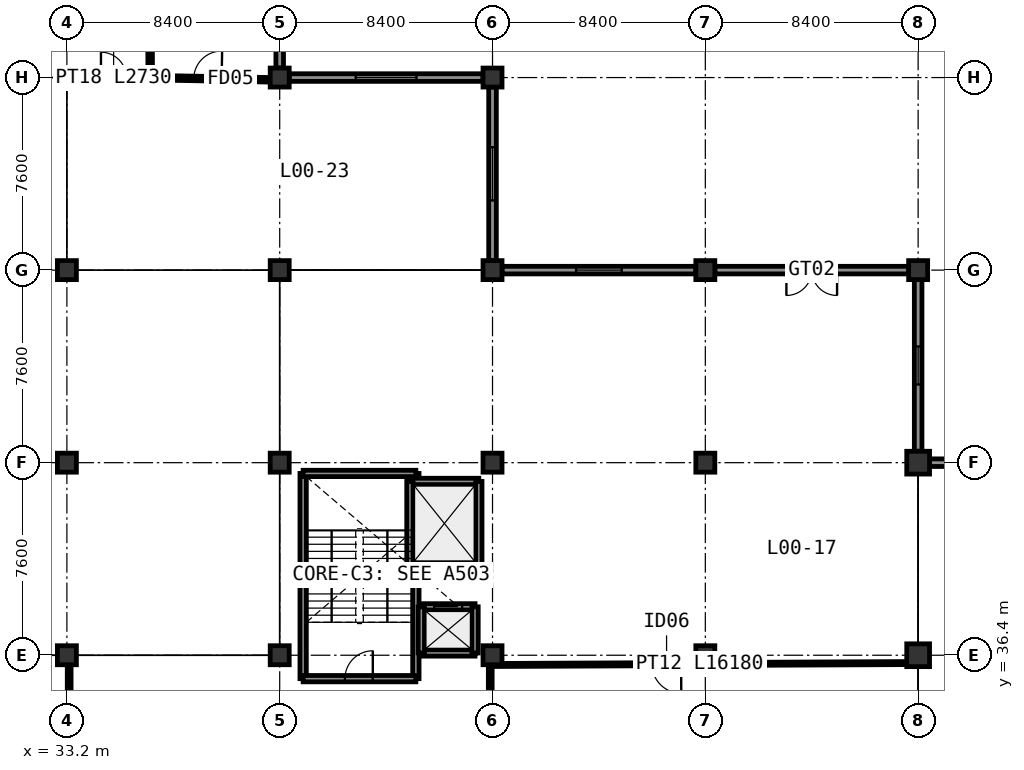
"""IFC4 building model, lengths in metres.
Left out: names, types, materials, properties, quantities, classifications, styles, units other than length and angle.
Written with IfcOpenShell. Run it as: python <this file> out.ifc"""

import sys

from ifc_helpers import new_model, si_unit, direction, frame, frame_2d, origin, origin_2d, place, context, subcontext, project, spatial, rectangle, extrude, element, fill, save


model = new_model("IFC4")
c1 = context("Model", 3, precision=1e-05, world=origin(), true_north=direction((0.0, 1.0)))
c2 = subcontext(c1, "Body", "Model", "MODEL_VIEW")
j1 = project(units=[si_unit("LENGTHUNIT", "METRE"), si_unit("PLANEANGLEUNIT", "RADIAN")], contexts=[c1])
p1 = place(None, origin())
s1 = spatial("IfcSite", under=j1, at=p1, CompositionType="ELEMENT")
p2 = place(p1, origin())
s2 = spatial("IfcBuilding", under=s1, at=p2, CompositionType="ELEMENT")
p3 = place(p2, origin())
s3 = spatial("IfcBuildingStorey", under=s2, at=p3, CompositionType="ELEMENT", Elevation=0.0)
for number, where, z_axis, x_axis in (
    (1, (33.2, 36.4, 0.0), (0.0, 0.0, 1.0), (1.0, 0.0, 0.0)),
    (2, (41.6, 36.4, 0.0), (0.0, 0.0, 1.0), (1.0, 0.0, 0.0)),
    (3, (50.0, 36.4, 0.0), (0.0, 0.0, 1.0), (1.0, 0.0, 0.0)),
    (4, (58.4, 36.4, 0.0), (0.0, 0.0, 1.0), (1.0, 0.0, 0.0)),
):
    element("IfcColumn", number, at=place(p3, frame(where, z_axis=z_axis, x_axis=x_axis)), inside=s3, PredefinedType="COLUMN", context=c2, shape_type="SweptSolid", body=[
        extrude(rectangle(XDim=0.75, YDim=0.75, at=origin_2d()), origin(), (0.0, 0.0, 1.0), 4.8),
    ])
p4 = place(p3, frame((66.8, 36.4, 0.0), z_axis=(0.0, 0.0, 1.0), x_axis=(1.0, 0.0, 0.0)))
e5 = element("IfcColumn", 5, at=p4, inside=s3, PredefinedType="COLUMN", context=c2, shape_type="SweptSolid", body=[
    extrude(rectangle(XDim=0.9, YDim=0.9, at=origin_2d()), origin(), (0.0, 0.0, 1.0), 4.8),
])
for number, where, z_axis, x_axis in (
    (6, (33.2, 44.0, 0.0), (0.0, 0.0, 1.0), (1.0, 0.0, 0.0)),
    (7, (41.6, 44.0, 0.0), (0.0, 0.0, 1.0), (1.0, 0.0, 0.0)),
    (8, (50.0, 44.0, 0.0), (0.0, 0.0, 1.0), (1.0, 0.0, 0.0)),
    (9, (58.4, 44.0, 0.0), (0.0, 0.0, 1.0), (1.0, 0.0, 0.0)),
):
    element("IfcColumn", number, at=place(p3, frame(where, z_axis=z_axis, x_axis=x_axis)), inside=s3, PredefinedType="COLUMN", context=c2, shape_type="SweptSolid", body=[
        extrude(rectangle(XDim=0.75, YDim=0.75, at=origin_2d()), origin(), (0.0, 0.0, 1.0), 4.8),
    ])
p5 = place(p3, frame((66.8, 44.0, 0.0), z_axis=(0.0, 0.0, 1.0), x_axis=(1.0, 0.0, 0.0)))
e10 = element("IfcColumn", 10, at=p5, inside=s3, PredefinedType="COLUMN", context=c2, shape_type="SweptSolid", body=[
    extrude(rectangle(XDim=0.9, YDim=0.9, at=origin_2d()), origin(), (0.0, 0.0, 1.0), 4.8),
])
for number, where, z_axis, x_axis in (
    (11, (33.2, 51.6, 0.0), (0.0, 0.0, 1.0), (1.0, 0.0, 0.0)),
    (12, (41.6, 51.6, 0.0), (0.0, 0.0, 1.0), (1.0, 0.0, 0.0)),
    (13, (50.0, 51.6, 0.0), (0.0, 0.0, 1.0), (1.0, 0.0, 0.0)),
    (14, (58.4, 51.6, 0.0), (0.0, 0.0, 1.0), (1.0, 0.0, 0.0)),
    (15, (66.8, 51.6, 0.0), (0.0, 0.0, 1.0), (1.0, 0.0, 0.0)),
    (16, (33.2, 59.2, 0.0), (0.0, 0.0, 1.0), (1.0, 0.0, 0.0)),
    (17, (41.6, 59.2, 0.0), (0.0, 0.0, 1.0), (1.0, 0.0, 0.0)),
    (18, (50.0, 59.2, 0.0), (0.0, 0.0, 1.0), (1.0, 0.0, 0.0)),
):
    element("IfcColumn", number, at=place(p3, frame(where, z_axis=z_axis, x_axis=x_axis)), inside=s3, PredefinedType="COLUMN", context=c2, shape_type="SweptSolid", body=[
        extrude(rectangle(XDim=0.75, YDim=0.75, at=origin_2d()), origin(), (0.0, 0.0, 1.0), 4.8),
    ])
p6 = place(p3, frame((74.75, 44.0, 0.0), z_axis=(0.0, 0.0, 1.0), x_axis=(-1.0, 0.0, 0.0)))
e19 = element("IfcWall", 19, at=p6, inside=s3, PredefinedType="SOLIDWALL", context=c2, shape_type="SweptSolid", body=[
    extrude(rectangle(XDim=7.5, YDim=0.3, at=frame_2d((3.75, 0.0))), origin(), (0.0, 0.0, 1.0), 4.047),
])
p7 = place(p6, frame((3.15, 0.0, 0.95)))
e20 = element("IfcOpeningElement", 20, at=p7, cuts=e19, PredefinedType="OPENING", context=c2, shape_type="SweptSolid", body=[
    extrude(rectangle(XDim=1.2, YDim=2.1, at=frame_2d((0.6, 1.05))), frame((0.0, 0.16, 0.0), z_axis=(0.0, -1.0, 0.0), x_axis=(1.0, 0.0, 0.0)), (0.0, 0.0, 1.0), 0.32),
])
p8 = place(p3, frame((66.8, 44.45, 0.0), z_axis=(0.0, 0.0, 1.0), x_axis=(0.0, 1.0, 0.0)))
e21 = element("IfcWall", 21, at=p8, inside=s3, PredefinedType="SOLIDWALL", context=c2, shape_type="SweptSolid", body=[
    extrude(rectangle(XDim=6.775, YDim=0.3, at=frame_2d((3.388, 0.0))), origin(), (0.0, 0.0, 1.0), 3.81),
])
p9 = place(p8, frame((2.637, 0.0, 0.95)))
e22 = element("IfcOpeningElement", 22, at=p9, cuts=e21, PredefinedType="OPENING", context=c2, shape_type="SweptSolid", body=[
    extrude(rectangle(XDim=1.5, YDim=2.1, at=frame_2d((0.75, 1.05))), frame((0.0, 0.16, 0.0), z_axis=(0.0, -1.0, 0.0), x_axis=(1.0, 0.0, 0.0)), (0.0, 0.0, 1.0), 0.32),
])
p10 = place(p3, frame((66.425, 51.6, 0.0), z_axis=(0.0, 0.0, 1.0), x_axis=(-1.0, 0.0, 0.0)))
e23 = element("IfcWall", 23, at=p10, inside=s3, PredefinedType="SOLIDWALL", context=c2, shape_type="SweptSolid", body=[
    extrude(rectangle(XDim=7.65, YDim=0.3, at=frame_2d((3.825, 0.0))), origin(), (0.0, 0.0, 1.0), 4.047),
])
p11 = place(p10, frame((2.825, 0.0, 0.0)))
e24 = element("IfcOpeningElement", 24, at=p11, cuts=e23, PredefinedType="OPENING", context=c2, shape_type="SweptSolid", body=[
    extrude(rectangle(XDim=2.0, YDim=2.1, at=frame_2d((1.0, 1.05))), frame((0.0, 0.16, 0.0), z_axis=(0.0, -1.0, 0.0), x_axis=(1.0, 0.0, 0.0)), (0.0, 0.0, 1.0), 0.32),
])
p12 = place(p3, frame((58.025, 51.6, 0.0), z_axis=(0.0, 0.0, 1.0), x_axis=(-1.0, 0.0, 0.0)))
e25 = element("IfcWall", 25, at=p12, inside=s3, PredefinedType="SOLIDWALL", context=c2, shape_type="SweptSolid", body=[
    extrude(rectangle(XDim=7.65, YDim=0.3, at=frame_2d((3.825, 0.0))), origin(), (0.0, 0.0, 1.0), 4.047),
])
p13 = place(p12, frame((2.925, 0.0, 0.95)))
e26 = element("IfcOpeningElement", 26, at=p13, cuts=e25, PredefinedType="OPENING", context=c2, shape_type="SweptSolid", body=[
    extrude(rectangle(XDim=1.8, YDim=2.1, at=frame_2d((0.9, 1.05))), frame((0.0, 0.16, 0.0), z_axis=(0.0, -1.0, 0.0), x_axis=(1.0, 0.0, 0.0)), (0.0, 0.0, 1.0), 0.32),
])
p14 = place(p3, frame((50.0, 51.975, 0.0), z_axis=(0.0, 0.0, 1.0), x_axis=(0.0, 1.0, 0.0)))
e27 = element("IfcWall", 27, at=p14, inside=s3, PredefinedType="SOLIDWALL", context=c2, shape_type="SweptSolid", body=[
    extrude(rectangle(XDim=6.85, YDim=0.3, at=frame_2d((3.425, 0.0))), origin(), (0.0, 0.0, 1.0), 4.5),
])
p15 = place(p14, frame((2.375, 0.0, 0.95)))
e28 = element("IfcOpeningElement", 28, at=p15, cuts=e27, PredefinedType="OPENING", context=c2, shape_type="SweptSolid", body=[
    extrude(rectangle(XDim=2.1, YDim=2.1, at=frame_2d((1.05, 1.05))), frame((0.0, 0.16, 0.0), z_axis=(0.0, -1.0, 0.0), x_axis=(1.0, 0.0, 0.0)), (0.0, 0.0, 1.0), 0.32),
])
p16 = place(p3, frame((49.625, 59.2, 0.0), z_axis=(0.0, 0.0, 1.0), x_axis=(-1.0, 0.0, 0.0)))
e29 = element("IfcWall", 29, at=p16, inside=s3, PredefinedType="SOLIDWALL", context=c2, shape_type="SweptSolid", body=[
    extrude(rectangle(XDim=7.65, YDim=0.3, at=frame_2d((3.825, 0.0))), origin(), (0.0, 0.0, 1.0), 4.5),
])
p17 = place(p16, frame((2.625, 0.0, 0.95)))
e30 = element("IfcOpeningElement", 30, at=p17, cuts=e29, PredefinedType="OPENING", context=c2, shape_type="SweptSolid", body=[
    extrude(rectangle(XDim=2.4, YDim=2.1, at=frame_2d((1.2, 1.05))), frame((0.0, 0.16, 0.0), z_axis=(0.0, -1.0, 0.0), x_axis=(1.0, 0.0, 0.0)), (0.0, 0.0, 1.0), 0.32),
])
p18 = place(p3, frame((41.6, 59.575, 0.0), z_axis=(0.0, 0.0, 1.0), x_axis=(0.0, 1.0, 0.0)))
e31 = element("IfcWall", 31, at=p18, inside=s3, PredefinedType="SOLIDWALL", context=c2, shape_type="SweptSolid", body=[
    extrude(rectangle(XDim=6.85, YDim=0.3, at=frame_2d((3.425, 0.0))), origin(), (0.0, 0.0, 1.0), 4.5),
])
p19 = place(p18, frame((2.075, 0.0, 0.95)))
e32 = element("IfcOpeningElement", 32, at=p19, cuts=e31, PredefinedType="OPENING", context=c2, shape_type="SweptSolid", body=[
    extrude(rectangle(XDim=2.7, YDim=2.1, at=frame_2d((1.35, 1.05))), frame((0.0, 0.16, 0.0), z_axis=(0.0, -1.0, 0.0), x_axis=(1.0, 0.0, 0.0)), (0.0, 0.0, 1.0), 0.32),
])
for number, where, z_axis, x_axis in (
    (33, (42.525, 35.475, 0.0), (0.0, 0.0, 1.0), (0.0, 1.0, 0.0)),
    (34, (46.975, 35.475, 0.0), (0.0, 0.0, 1.0), (0.0, 1.0, 0.0)),
):
    element("IfcWall", number, at=place(p3, frame(where, z_axis=z_axis, x_axis=x_axis)), inside=s3, PredefinedType="SHEAR", context=c2, shape_type="SweptSolid", body=[
        extrude(rectangle(XDim=8.1, YDim=0.25, at=frame_2d((4.05, 0.0))), origin(), (0.0, 0.0, 1.0), 4.52),
    ])
p20 = place(p3, frame((42.525, 43.575, 0.0), z_axis=(0.0, 0.0, 1.0), x_axis=(1.0, 0.0, 0.0)))
e35 = element("IfcWall", 35, at=p20, inside=s3, PredefinedType="SHEAR", context=c2, shape_type="SweptSolid", body=[
    extrude(rectangle(XDim=4.45, YDim=0.25, at=frame_2d((2.225, 0.0))), origin(), (0.0, 0.0, 1.0), 4.52),
])
p21 = place(p3, frame((42.525, 35.475, 0.0), z_axis=(0.0, 0.0, 1.0), x_axis=(1.0, 0.0, 0.0)))
e36 = element("IfcWall", 36, at=p21, inside=s3, PredefinedType="SHEAR", context=c2, shape_type="SweptSolid", body=[
    extrude(rectangle(XDim=4.45, YDim=0.25, at=frame_2d((2.225, 0.0))), origin(), (0.0, 0.0, 1.0), 4.52),
])
p22 = place(p21, frame((1.65, 0.0, 0.0)))
e37 = element("IfcOpeningElement", 37, at=p22, cuts=e36, PredefinedType="OPENING", context=c2, shape_type="SweptSolid", body=[
    extrude(rectangle(XDim=1.1, YDim=2.1, at=frame_2d((0.55, 1.05))), frame((0.0, 0.135, 0.0), z_axis=(0.0, -1.0, 0.0), x_axis=(1.0, 0.0, 0.0)), (0.0, 0.0, 1.0), 0.27),
])
p23 = place(p3, frame((47.19, 36.49, 0.0), z_axis=(0.0, 0.0, 1.0), x_axis=(1.0, 0.0, 0.0)))
e38 = element("IfcWall", 38, at=p23, inside=s3, PredefinedType="SHEAR", context=c2, shape_type="SweptSolid", body=[
    extrude(rectangle(XDim=2.12, YDim=0.25, at=frame_2d((1.06, 0.0))), origin(), (0.0, 0.0, 1.0), 4.52),
])
p24 = place(p3, frame((47.19, 38.31, 0.0), z_axis=(0.0, 0.0, 1.0), x_axis=(1.0, 0.0, 0.0)))
e39 = element("IfcWall", 39, at=p24, inside=s3, PredefinedType="SHEAR", context=c2, shape_type="SweptSolid", body=[
    extrude(rectangle(XDim=2.12, YDim=0.25, at=frame_2d((1.06, 0.0))), origin(), (0.0, 0.0, 1.0), 4.52),
])
p25 = place(p24, frame((0.51, 0.0, 0.0)))
e40 = element("IfcOpeningElement", 40, at=p25, cuts=e39, PredefinedType="OPENING", context=c2, shape_type="SweptSolid", body=[
    extrude(rectangle(XDim=1.1, YDim=2.15, at=frame_2d((0.55, 1.075))), frame((0.0, 0.135, 0.0), z_axis=(0.0, -1.0, 0.0), x_axis=(1.0, 0.0, 0.0)), (0.0, 0.0, 1.0), 0.27),
])
for number, where, z_axis, x_axis in (
    (41, (47.19, 36.49, 0.0), (0.0, 0.0, 1.0), (0.0, 1.0, 0.0)),
    (42, (49.31, 36.49, 0.0), (0.0, 0.0, 1.0), (0.0, 1.0, 0.0)),
):
    element("IfcWall", number, at=place(p3, frame(where, z_axis=z_axis, x_axis=x_axis)), inside=s3, PredefinedType="SHEAR", context=c2, shape_type="SweptSolid", body=[
        extrude(rectangle(XDim=1.82, YDim=0.25, at=frame_2d((0.91, 0.0))), origin(), (0.0, 0.0, 1.0), 4.52),
    ])
p26 = place(p3, frame((46.74, 39.94, 0.0), z_axis=(0.0, 0.0, 1.0), x_axis=(1.0, 0.0, 0.0)))
e43 = element("IfcWall", 43, at=p26, inside=s3, PredefinedType="SHEAR", context=c2, shape_type="SweptSolid", body=[
    extrude(rectangle(XDim=2.72, YDim=0.25, at=frame_2d((1.36, 0.0))), origin(), (0.0, 0.0, 1.0), 4.52),
])
p27 = place(p26, frame((0.61, 0.0, 0.0)))
e44 = element("IfcOpeningElement", 44, at=p27, cuts=e43, PredefinedType="OPENING", context=c2, shape_type="SweptSolid", body=[
    extrude(rectangle(XDim=1.5, YDim=2.3, at=frame_2d((0.75, 1.15))), frame((0.0, 0.135, 0.0), z_axis=(0.0, -1.0, 0.0), x_axis=(1.0, 0.0, 0.0)), (0.0, 0.0, 1.0), 0.27),
])
p28 = place(p3, frame((46.74, 43.26, 0.0), z_axis=(0.0, 0.0, 1.0), x_axis=(1.0, 0.0, 0.0)))
e45 = element("IfcWall", 45, at=p28, inside=s3, PredefinedType="SHEAR", context=c2, shape_type="SweptSolid", body=[
    extrude(rectangle(XDim=2.72, YDim=0.25, at=frame_2d((1.36, 0.0))), origin(), (0.0, 0.0, 1.0), 4.52),
])
for number, where, z_axis, x_axis in (
    (46, (46.74, 39.94, 0.0), (0.0, 0.0, 1.0), (0.0, 1.0, 0.0)),
    (47, (49.46, 39.94, 0.0), (0.0, 0.0, 1.0), (0.0, 1.0, 0.0)),
):
    element("IfcWall", number, at=place(p3, frame(where, z_axis=z_axis, x_axis=x_axis)), inside=s3, PredefinedType="SHEAR", context=c2, shape_type="SweptSolid", body=[
        extrude(rectangle(XDim=3.32, YDim=0.25, at=frame_2d((1.66, 0.0))), origin(), (0.0, 0.0, 1.0), 4.52),
    ])
p29 = place(p3, frame((33.68, 59.2, 0.0), z_axis=(0.0, 0.0, 1.0), x_axis=(1.0, 0.0, 0.0)))
e48 = element("IfcWall", 48, at=p29, inside=s3, PredefinedType="PARTITIONING", context=c2, shape_type="SweptSolid", body=[
    extrude(rectangle(XDim=2.729, YDim=0.18, at=frame_2d((1.365, 0.0))), origin(), (0.0, 0.0, 1.0), 4.5),
])
p30 = place(p29, frame((0.865, 0.0, 0.0)))
e49 = element("IfcOpeningElement", 49, at=p30, cuts=e48, PredefinedType="OPENING", context=c2, shape_type="SweptSolid", body=[
    extrude(rectangle(XDim=1.0, YDim=2.1, at=frame_2d((0.5, 1.05))), frame((0.0, 0.1, 0.0), z_axis=(0.0, -1.0, 0.0), x_axis=(1.0, 0.0, 0.0)), (0.0, 0.0, 1.0), 0.2),
])
p31 = place(p3, frame((66.26, 36.09, 0.0), z_axis=(0.0, 0.0, 1.0), x_axis=(-0.999989479484, -0.004587038489, 0.0)))
e50 = element("IfcWall", 50, at=p31, inside=s3, PredefinedType="PARTITIONING", context=c2, shape_type="SweptSolid", body=[
    extrude(rectangle(XDim=16.18, YDim=0.12, at=frame_2d((8.09, 0.0))), origin(), (0.0, 0.0, 1.0), 4.5),
])
p32 = place(p31, frame((8.815, 0.0, 0.0)))
e51 = element("IfcOpeningElement", 51, at=p32, cuts=e50, PredefinedType="OPENING", context=c2, shape_type="SweptSolid", body=[
    extrude(rectangle(XDim=1.15, YDim=2.12, at=frame_2d((0.575, 1.06))), frame((0.0, 0.07, 0.0), z_axis=(0.0, -1.0, 0.0), x_axis=(1.0, 0.0, 0.0)), (0.0, 0.0, 1.0), 0.14),
])
p33 = place(p3, frame((36.49, 59.29, 0.0), z_axis=(0.0, 0.0, 1.0), x_axis=(-0.004757754169, 0.999988681824, 0.0)))
e52 = element("IfcWall", 52, at=p33, inside=s3, PredefinedType="PARTITIONING", context=c2, shape_type="SweptSolid", body=[
    extrude(rectangle(XDim=18.73, YDim=0.18, at=frame_2d((9.365, 0.0))), origin(), (0.0, 0.0, 1.0), 4.5),
])
p34 = place(p33, frame((8.865, 0.0, 0.0)))
e53 = element("IfcOpeningElement", 53, at=p34, cuts=e52, PredefinedType="OPENING", context=c2, shape_type="SweptSolid", body=[
    extrude(rectangle(XDim=1.0, YDim=2.1, at=frame_2d((0.5, 1.05))), frame((0.0, 0.1, 0.0), z_axis=(0.0, -1.0, 0.0), x_axis=(1.0, 0.0, 0.0)), (0.0, 0.0, 1.0), 0.2),
])
p35 = place(p3, frame((33.29, 29.265, 0.0), z_axis=(0.0, 0.0, 1.0), x_axis=(0.0, 1.0, 0.0)))
e54 = element("IfcWall", 54, at=p35, inside=s3, PredefinedType="PARTITIONING", context=c2, shape_type="SweptSolid", body=[
    extrude(rectangle(XDim=6.655, YDim=0.15, at=frame_2d((3.328, 0.0))), origin(), (0.0, 0.0, 1.0), 4.5),
])
p36 = place(p35, frame((2.603, 0.0, 0.0)))
e55 = element("IfcOpeningElement", 55, at=p36, cuts=e54, PredefinedType="OPENING", context=c2, shape_type="SweptSolid", body=[
    extrude(rectangle(XDim=1.45, YDim=2.18, at=frame_2d((0.725, 1.09))), frame((0.0, 0.085, 0.0), z_axis=(0.0, -1.0, 0.0), x_axis=(1.0, 0.0, 0.0)), (0.0, 0.0, 1.0), 0.17),
])
p37 = place(p3, frame((49.91, 35.92, 0.0), z_axis=(0.0, 0.0, 1.0), x_axis=(-7.3370263e-05, -0.999999997308, 0.0)))
e56 = element("IfcWall", 56, at=p37, inside=s3, PredefinedType="PARTITIONING", context=c2, shape_type="SweptSolid", body=[
    extrude(rectangle(XDim=6.655, YDim=0.15, at=frame_2d((3.328, 0.0))), origin(), (0.0, 0.0, 1.0), 3.81),
])
p38 = place(p37, frame((2.502, 0.0, 0.0)))
e57 = element("IfcOpeningElement", 57, at=p38, cuts=e56, PredefinedType="OPENING", context=c2, shape_type="SweptSolid", body=[
    extrude(rectangle(XDim=1.65, YDim=2.18, at=frame_2d((0.825, 1.09))), frame((0.0, 0.085, 0.0), z_axis=(0.0, -1.0, 0.0), x_axis=(1.0, 0.0, 0.0)), (0.0, 0.0, 1.0), 0.17),
])
p39 = place(p3, frame((36.381, 59.198, 0.0), z_axis=(0.0, 0.0, 1.0), x_axis=(0.9998376067, -0.018021105061, 0.0)))
e58 = element("IfcWall", 58, at=p39, inside=s3, PredefinedType="PARTITIONING", context=c2, shape_type="SweptSolid", body=[
    extrude(rectangle(XDim=4.755, YDim=0.18, at=frame_2d((2.377, 0.0))), origin(), (0.0, 0.0, 1.0), 4.5),
])
p40 = place(p39, frame((1.828, 0.0, 0.0)))
e59 = element("IfcOpeningElement", 59, at=p40, cuts=e58, PredefinedType="OPENING", context=c2, shape_type="SweptSolid", body=[
    extrude(rectangle(XDim=1.1, YDim=2.1, at=frame_2d((0.55, 1.05))), frame((0.0, 0.1, 0.0), z_axis=(0.0, -1.0, 0.0), x_axis=(1.0, 0.0, 0.0)), (0.0, 0.0, 1.0), 0.2),
])
p41 = place(p9, origin())
e60 = element("IfcWindow", 60, at=p41, inside=s3, PartitioningType="SINGLE_PANEL", PredefinedType="WINDOW", context=c2, shape_type="SweptSolid", body=[
    extrude(rectangle(XDim=1.5, YDim=2.1, at=frame_2d((0.75, 1.05))), frame((0.0, 0.03, 0.0), z_axis=(0.0, -1.0, 0.0), x_axis=(1.0, 0.0, 0.0)), (0.0, 0.0, 1.0), 0.06),
])
fill(e22, e60)
p42 = place(p11, origin())
e61 = element("IfcDoor", 61, at=p42, inside=s3, OperationType="DOUBLE_DOOR_SINGLE_SWING", PredefinedType="GATE", context=c2, shape_type="SweptSolid", body=[
    extrude(rectangle(XDim=2.0, YDim=2.1, at=frame_2d((1.0, 1.05))), frame((0.0, 0.025, 0.0), z_axis=(0.0, -1.0, 0.0), x_axis=(1.0, 0.0, 0.0)), (0.0, 0.0, 1.0), 0.05),
])
fill(e24, e61)
p43 = place(p13, origin())
e62 = element("IfcWindow", 62, at=p43, inside=s3, PartitioningType="DOUBLE_PANEL_VERTICAL", PredefinedType="WINDOW", context=c2, shape_type="SweptSolid", body=[
    extrude(rectangle(XDim=1.8, YDim=2.1, at=frame_2d((0.9, 1.05))), frame((0.0, 0.03, 0.0), z_axis=(0.0, -1.0, 0.0), x_axis=(1.0, 0.0, 0.0)), (0.0, 0.0, 1.0), 0.06),
])
fill(e26, e62)
p44 = place(p15, origin())
e63 = element("IfcWindow", 63, at=p44, inside=s3, PartitioningType="DOUBLE_PANEL_VERTICAL", PredefinedType="WINDOW", context=c2, shape_type="SweptSolid", body=[
    extrude(rectangle(XDim=2.1, YDim=2.1, at=frame_2d((1.05, 1.05))), frame((0.0, 0.03, 0.0), z_axis=(0.0, -1.0, 0.0), x_axis=(1.0, 0.0, 0.0)), (0.0, 0.0, 1.0), 0.06),
])
fill(e28, e63)
p45 = place(p17, origin())
e64 = element("IfcWindow", 64, at=p45, inside=s3, PartitioningType="DOUBLE_PANEL_VERTICAL", PredefinedType="WINDOW", context=c2, shape_type="SweptSolid", body=[
    extrude(rectangle(XDim=2.4, YDim=2.1, at=frame_2d((1.2, 1.05))), frame((0.0, 0.03, 0.0), z_axis=(0.0, -1.0, 0.0), x_axis=(1.0, 0.0, 0.0)), (0.0, 0.0, 1.0), 0.06),
])
fill(e30, e64)
p46 = place(p22, frame((1.1, 0.0, 0.0), z_axis=(0.0, 0.0, 1.0), x_axis=(-1.0, 0.0, 0.0)))
e65 = element("IfcDoor", 65, at=p46, inside=s3, OperationType="SINGLE_SWING_RIGHT", PredefinedType="DOOR", context=c2, shape_type="SweptSolid", body=[
    extrude(rectangle(XDim=1.1, YDim=2.1, at=frame_2d((0.55, 1.05))), frame((0.0, 0.025, 0.0), z_axis=(0.0, -1.0, 0.0), x_axis=(1.0, 0.0, 0.0)), (0.0, 0.0, 1.0), 0.05),
])
fill(e37, e65)
p47 = place(p25, origin())
e66 = element("IfcDoor", 66, at=p47, inside=s3, OperationType="SLIDING_TO_LEFT", PredefinedType="DOOR", context=c2, shape_type="SweptSolid", body=[
    extrude(rectangle(XDim=1.1, YDim=2.15, at=frame_2d((0.55, 1.075))), frame((0.0, 0.025, 0.0), z_axis=(0.0, -1.0, 0.0), x_axis=(1.0, 0.0, 0.0)), (0.0, 0.0, 1.0), 0.05),
])
fill(e40, e66)
p48 = place(p27, origin())
e67 = element("IfcDoor", 67, at=p48, inside=s3, OperationType="SLIDING_TO_LEFT", PredefinedType="DOOR", context=c2, shape_type="SweptSolid", body=[
    extrude(rectangle(XDim=1.5, YDim=2.3, at=frame_2d((0.75, 1.15))), frame((0.0, 0.025, 0.0), z_axis=(0.0, -1.0, 0.0), x_axis=(1.0, 0.0, 0.0)), (0.0, 0.0, 1.0), 0.05),
])
fill(e44, e67)
p49 = place(p30, origin())
e68 = element("IfcDoor", 68, at=p49, inside=s3, OperationType="SINGLE_SWING_LEFT", PredefinedType="DOOR", context=c2, shape_type="SweptSolid", body=[
    extrude(rectangle(XDim=1.0, YDim=2.1, at=frame_2d((0.5, 1.05))), frame((0.0, 0.025, 0.0), z_axis=(0.0, -1.0, 0.0), x_axis=(1.0, 0.0, 0.0)), (0.0, 0.0, 1.0), 0.05),
])
fill(e49, e68)
p50 = place(p32, origin())
e69 = element("IfcDoor", 69, at=p50, inside=s3, OperationType="SINGLE_SWING_LEFT", PredefinedType="DOOR", context=c2, shape_type="SweptSolid", body=[
    extrude(rectangle(XDim=1.15, YDim=2.12, at=frame_2d((0.575, 1.06))), frame((0.0, 0.025, 0.0), z_axis=(0.0, -1.0, 0.0), x_axis=(1.0, 0.0, 0.0)), (0.0, 0.0, 1.0), 0.05),
])
fill(e51, e69)
p51 = place(p40, origin())
e70 = element("IfcDoor", 70, at=p51, inside=s3, OperationType="SINGLE_SWING_RIGHT", PredefinedType="DOOR", context=c2, shape_type="SweptSolid", body=[
    extrude(rectangle(XDim=1.1, YDim=2.1, at=frame_2d((0.55, 1.05))), frame((0.0, 0.025, 0.0), z_axis=(0.0, -1.0, 0.0), x_axis=(1.0, 0.0, 0.0)), (0.0, 0.0, 1.0), 0.05),
])
fill(e59, e70)
save(model, sys.argv[1])
